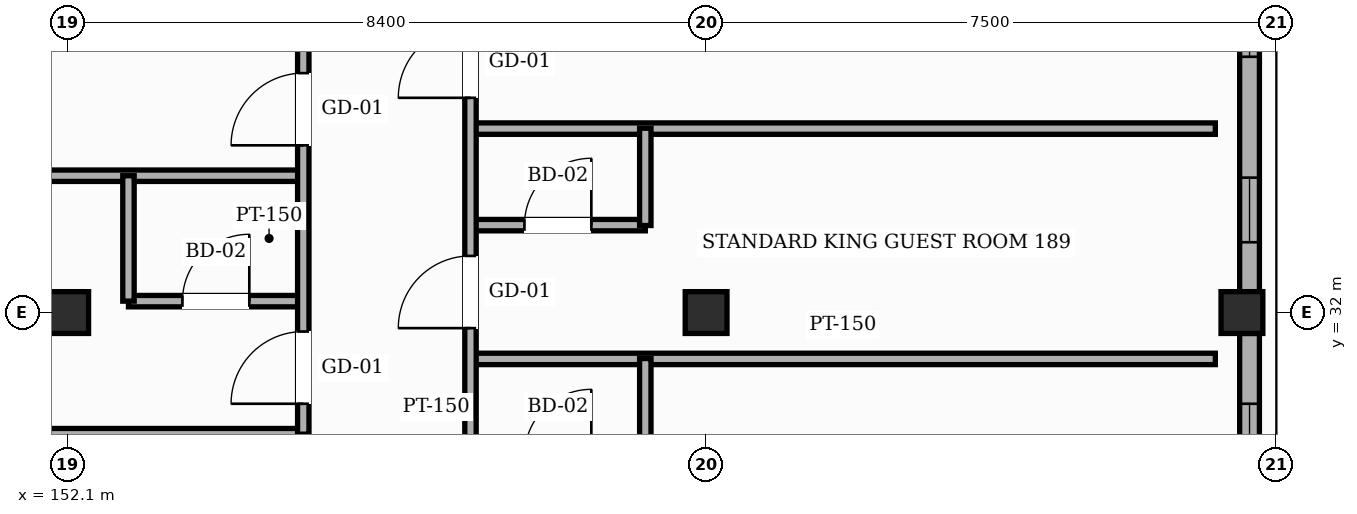
"""IFC4 building model, lengths in metres.
Left out: names, types, materials, properties, quantities, classifications, styles, units other than length and angle.
Written with IfcOpenShell. Run it as: python <this file> out.ifc"""

import sys

from ifc_helpers import new_model, si_unit, direction, frame, frame_2d, origin, origin_2d, place, context, subcontext, project, spatial, rectangle, hollow_rectangle, extrude, element, fill, save


model = new_model("IFC4")
c1 = context("Model", 3, precision=1e-05, world=origin(), true_north=direction((0.0, 1.0)))
c2 = subcontext(c1, "Body", "Model", "MODEL_VIEW")
j1 = project(units=[si_unit("LENGTHUNIT", "METRE"), si_unit("PLANEANGLEUNIT", "RADIAN")], contexts=[c1])
p1 = place(None, origin())
s1 = spatial("IfcSite", under=j1, at=p1, CompositionType="ELEMENT")
p2 = place(p1, origin())
s2 = spatial("IfcBuilding", under=s1, at=p2, CompositionType="ELEMENT")
p3 = place(p2, frame((0.0, 0.0, 31.8)))
s3 = spatial("IfcBuildingStorey", under=s2, at=p3, CompositionType="ELEMENT", Elevation=31.8)
for number, where, z_axis, x_axis in (
    (1, (152.1, 32.0, 0.0), (0.0, 0.0, 1.0), (1.0, 0.0, 0.0)),
    (2, (160.5, 32.0, 0.0), (0.0, 0.0, 1.0), (1.0, 0.0, 0.0)),
    (3, (167.55, 32.0, 0.0), (0.0, 0.0, 1.0), (1.0, 0.0, 0.0)),
):
    element("IfcColumn", number, at=place(p3, frame(where, z_axis=z_axis, x_axis=x_axis)), inside=s3, PredefinedType="COLUMN", context=c2, shape_type="SweptSolid", body=[
        extrude(hollow_rectangle(XDim=0.55, YDim=0.55, WallThickness=0.022, InnerFilletRadius=0.022, OuterFilletRadius=0.044, at=origin_2d()), origin(), (0.0, 0.0, 1.0), 3.6),
    ])
p4 = place(p3, frame((167.65, 31.725, 0.0), z_axis=(0.0, 0.0, 1.0), x_axis=(0.0, -1.0, 0.0)))
e4 = element("IfcWall", 4, at=p4, inside=s3, PredefinedType="SOLIDWALL", context=c2, shape_type="SweptSolid", body=[
    extrude(rectangle(XDim=7.45, YDim=0.26, at=frame_2d((3.725, 0.0))), origin(), (0.0, 0.0, 1.0), 2.755),
])
p5 = place(p4, frame((4.055, 0.0, 0.85)))
e5 = element("IfcOpeningElement", 5, at=p5, cuts=e4, PredefinedType="OPENING", context=c2, shape_type="SweptSolid", body=[
    extrude(rectangle(XDim=1.65, YDim=1.5, at=frame_2d((0.825, 0.75))), frame((0.0, 0.14, 0.0), z_axis=(0.0, -1.0, 0.0), x_axis=(1.0, 0.0, 0.0)), (0.0, 0.0, 1.0), 0.28),
])
p6 = place(p4, frame((0.925, 0.0, 0.85)))
e6 = element("IfcOpeningElement", 6, at=p6, cuts=e4, PredefinedType="OPENING", context=c2, shape_type="SweptSolid", body=[
    extrude(rectangle(XDim=1.85, YDim=1.5, at=frame_2d((0.925, 0.75))), frame((0.0, 0.14, 0.0), z_axis=(0.0, -1.0, 0.0), x_axis=(1.0, 0.0, 0.0)), (0.0, 0.0, 1.0), 0.28),
])
p7 = place(p3, frame((167.65, 40.625, 0.0), z_axis=(0.0, 0.0, 1.0), x_axis=(0.0, -1.0, 0.0)))
e7 = element("IfcWall", 7, at=p7, inside=s3, PredefinedType="SOLIDWALL", context=c2, shape_type="SweptSolid", body=[
    extrude(rectangle(XDim=8.35, YDim=0.26, at=frame_2d((4.175, 0.0))), origin(), (0.0, 0.0, 1.0), 2.755),
])
p8 = place(p7, frame((6.85, 0.0, 0.85)))
e8 = element("IfcOpeningElement", 8, at=p8, cuts=e7, PredefinedType="OPENING", context=c2, shape_type="SweptSolid", body=[
    extrude(rectangle(XDim=0.85, YDim=1.35, at=frame_2d((0.425, 0.675))), frame((0.0, 0.14, 0.0), z_axis=(0.0, -1.0, 0.0), x_axis=(1.0, 0.0, 0.0)), (0.0, 0.0, 1.0), 0.28),
])
p9 = place(p7, frame((4.11, 0.0, 0.85)))
e9 = element("IfcOpeningElement", 9, at=p9, cuts=e7, PredefinedType="OPENING", context=c2, shape_type="SweptSolid", body=[
    extrude(rectangle(XDim=1.15, YDim=1.65, at=frame_2d((0.575, 0.825))), frame((0.0, 0.14, 0.0), z_axis=(0.0, -1.0, 0.0), x_axis=(1.0, 0.0, 0.0)), (0.0, 0.0, 1.0), 0.28),
])
p10 = place(p7, frame((0.98, 0.0, 0.85)))
e10 = element("IfcOpeningElement", 10, at=p10, cuts=e7, PredefinedType="OPENING", context=c2, shape_type="SweptSolid", body=[
    extrude(rectangle(XDim=1.35, YDim=1.65, at=frame_2d((0.675, 0.825))), frame((0.0, 0.14, 0.0), z_axis=(0.0, -1.0, 0.0), x_axis=(1.0, 0.0, 0.0)), (0.0, 0.0, 1.0), 0.28),
])
p11 = place(p3, frame((144.2, 30.4, 0.0), z_axis=(0.0, 0.0, 1.0), x_axis=(1.0, 0.0, 0.0)))
e11 = element("IfcWall", 11, at=p11, inside=s3, PredefinedType="PARTITIONING", context=c2, shape_type="SweptSolid", body=[
    extrude(rectangle(XDim=11.0, YDim=0.15, at=frame_2d((5.5, 0.0))), origin(), (0.0, 0.0, 1.0), 3.365),
])
p12 = place(p3, frame((157.4, 31.39, 0.0), z_axis=(0.0, 0.0, 1.0), x_axis=(1.0, 0.0, 0.0)))
e12 = element("IfcWall", 12, at=p12, inside=s3, PredefinedType="PARTITIONING", context=c2, shape_type="SweptSolid", body=[
    extrude(rectangle(XDim=9.8, YDim=0.15, at=frame_2d((4.9, 0.0))), origin(), (0.0, 0.0, 1.0), 3.365),
])
p13 = place(p3, frame((152.9, 32.15, 0.0), z_axis=(0.0, 0.0, 1.0), x_axis=(1.0, 0.0, 0.0)))
e13 = element("IfcWall", 13, at=p13, inside=s3, PredefinedType="PARTITIONING", context=c2, shape_type="SweptSolid", body=[
    extrude(rectangle(XDim=2.3, YDim=0.15, at=frame_2d((1.15, 0.0))), origin(), (0.0, 0.0, 1.0), 2.755),
])
p14 = place(p13, frame((0.71, 0.0, 0.0)))
e14 = element("IfcOpeningElement", 14, at=p14, cuts=e13, PredefinedType="OPENING", context=c2, shape_type="SweptSolid", body=[
    extrude(rectangle(XDim=0.88, YDim=2.12, at=frame_2d((0.44, 1.06))), frame((0.0, 0.085, 0.0), z_axis=(0.0, -1.0, 0.0), x_axis=(1.0, 0.0, 0.0)), (0.0, 0.0, 1.0), 0.17),
])
p15 = place(p3, frame((157.4, 33.15, 0.0), z_axis=(0.0, 0.0, 1.0), x_axis=(1.0, 0.0, 0.0)))
e15 = element("IfcWall", 15, at=p15, inside=s3, PredefinedType="PARTITIONING", context=c2, shape_type="SweptSolid", body=[
    extrude(rectangle(XDim=2.3, YDim=0.15, at=frame_2d((1.15, 0.0))), origin(), (0.0, 0.0, 1.0), 3.365),
])
p16 = place(p15, frame((0.71, 0.0, 0.0)))
e16 = element("IfcOpeningElement", 16, at=p16, cuts=e15, PredefinedType="OPENING", context=c2, shape_type="SweptSolid", body=[
    extrude(rectangle(XDim=0.88, YDim=2.12, at=frame_2d((0.44, 1.06))), frame((0.0, 0.085, 0.0), z_axis=(0.0, -1.0, 0.0), x_axis=(1.0, 0.0, 0.0)), (0.0, 0.0, 1.0), 0.17),
])
p17 = place(p3, frame((144.2, 33.8, 0.0), z_axis=(0.0, 0.0, 1.0), x_axis=(1.0, 0.0, 0.0)))
e17 = element("IfcWall", 17, at=p17, inside=s3, PredefinedType="PARTITIONING", context=c2, shape_type="SweptSolid", body=[
    extrude(rectangle(XDim=11.0, YDim=0.15, at=frame_2d((5.5, 0.0))), origin(), (0.0, 0.0, 1.0), 3.365),
])
p18 = place(p3, frame((157.4, 34.42, 0.0), z_axis=(0.0, 0.0, 1.0), x_axis=(1.0, 0.0, 0.0)))
e18 = element("IfcWall", 18, at=p18, inside=s3, PredefinedType="PARTITIONING", context=c2, shape_type="SweptSolid", body=[
    extrude(rectangle(XDim=9.8, YDim=0.15, at=frame_2d((4.9, 0.0))), origin(), (0.0, 0.0, 1.0), 3.365),
])
p19 = place(p3, frame((152.9, 32.15, 0.0), z_axis=(0.0, 0.0, 1.0), x_axis=(0.0, 1.0, 0.0)))
e19 = element("IfcWall", 19, at=p19, inside=s3, PredefinedType="PARTITIONING", context=c2, shape_type="SweptSolid", body=[
    extrude(rectangle(XDim=1.65, YDim=0.15, at=frame_2d((0.825, 0.0))), origin(), (0.0, 0.0, 1.0), 3.365),
])
p20 = place(p3, frame((155.2, 30.4, 0.0), z_axis=(0.0, 0.0, 1.0), x_axis=(0.0, 1.0, 0.0)))
e20 = element("IfcWall", 20, at=p20, inside=s3, PredefinedType="PARTITIONING", context=c2, shape_type="SweptSolid", body=[
    extrude(rectangle(XDim=10.2, YDim=0.15, at=frame_2d((5.1, 0.0))), origin(), (0.0, 0.0, 1.0), 3.365),
])
p21 = place(p20, frame((0.4, 0.0, 0.0)))
e21 = element("IfcOpeningElement", 21, at=p21, cuts=e20, PredefinedType="OPENING", context=c2, shape_type="SweptSolid", body=[
    extrude(rectangle(XDim=0.95, YDim=2.15, at=frame_2d((0.475, 1.075))), frame((0.0, 0.085, 0.0), z_axis=(0.0, -1.0, 0.0), x_axis=(1.0, 0.0, 0.0)), (0.0, 0.0, 1.0), 0.17),
])
p22 = place(p20, frame((3.8, 0.0, 0.0)))
e22 = element("IfcOpeningElement", 22, at=p22, cuts=e20, PredefinedType="OPENING", context=c2, shape_type="SweptSolid", body=[
    extrude(rectangle(XDim=0.95, YDim=2.15, at=frame_2d((0.475, 1.075))), frame((0.0, 0.085, 0.0), z_axis=(0.0, -1.0, 0.0), x_axis=(1.0, 0.0, 0.0)), (0.0, 0.0, 1.0), 0.17),
])
p23 = place(p20, frame((7.2, 0.0, 0.0)))
e23 = element("IfcOpeningElement", 23, at=p23, cuts=e20, PredefinedType="OPENING", context=c2, shape_type="SweptSolid", body=[
    extrude(rectangle(XDim=0.95, YDim=2.15, at=frame_2d((0.475, 1.075))), frame((0.0, 0.085, 0.0), z_axis=(0.0, -1.0, 0.0), x_axis=(1.0, 0.0, 0.0)), (0.0, 0.0, 1.0), 0.17),
])
p24 = place(p3, frame((157.4, 22.3, 0.0), z_axis=(0.0, 0.0, 1.0), x_axis=(0.0, 1.0, 0.0)))
e24 = element("IfcWall", 24, at=p24, inside=s3, PredefinedType="PARTITIONING", context=c2, shape_type="SweptSolid", body=[
    extrude(rectangle(XDim=48.5, YDim=0.15, at=frame_2d((24.25, 0.0))), origin(), (0.0, 0.0, 1.0), 3.365),
])
p25 = place(p24, frame((0.4, 0.0, 0.0)))
e25 = element("IfcOpeningElement", 25, at=p25, cuts=e24, PredefinedType="OPENING", context=c2, shape_type="SweptSolid", body=[
    extrude(rectangle(XDim=0.95, YDim=2.15, at=frame_2d((0.475, 1.075))), frame((0.0, 0.085, 0.0), z_axis=(0.0, -1.0, 0.0), x_axis=(1.0, 0.0, 0.0)), (0.0, 0.0, 1.0), 0.17),
])
p26 = place(p24, frame((3.43, 0.0, 0.0)))
e26 = element("IfcOpeningElement", 26, at=p26, cuts=e24, PredefinedType="OPENING", context=c2, shape_type="SweptSolid", body=[
    extrude(rectangle(XDim=0.95, YDim=2.15, at=frame_2d((0.475, 1.075))), frame((0.0, 0.085, 0.0), z_axis=(0.0, -1.0, 0.0), x_axis=(1.0, 0.0, 0.0)), (0.0, 0.0, 1.0), 0.17),
])
p27 = place(p24, frame((6.46, 0.0, 0.0)))
e27 = element("IfcOpeningElement", 27, at=p27, cuts=e24, PredefinedType="OPENING", context=c2, shape_type="SweptSolid", body=[
    extrude(rectangle(XDim=0.95, YDim=2.15, at=frame_2d((0.475, 1.075))), frame((0.0, 0.085, 0.0), z_axis=(0.0, -1.0, 0.0), x_axis=(1.0, 0.0, 0.0)), (0.0, 0.0, 1.0), 0.17),
])
p28 = place(p24, frame((9.495, 0.0, 0.0)))
e28 = element("IfcOpeningElement", 28, at=p28, cuts=e24, PredefinedType="OPENING", context=c2, shape_type="SweptSolid", body=[
    extrude(rectangle(XDim=0.95, YDim=2.15, at=frame_2d((0.475, 1.075))), frame((0.0, 0.085, 0.0), z_axis=(0.0, -1.0, 0.0), x_axis=(1.0, 0.0, 0.0)), (0.0, 0.0, 1.0), 0.17),
])
p29 = place(p24, frame((12.525, 0.0, 0.0)))
e29 = element("IfcOpeningElement", 29, at=p29, cuts=e24, PredefinedType="OPENING", context=c2, shape_type="SweptSolid", body=[
    extrude(rectangle(XDim=0.95, YDim=2.15, at=frame_2d((0.475, 1.075))), frame((0.0, 0.085, 0.0), z_axis=(0.0, -1.0, 0.0), x_axis=(1.0, 0.0, 0.0)), (0.0, 0.0, 1.0), 0.17),
])
p30 = place(p24, frame((15.555, 0.0, 0.0)))
e30 = element("IfcOpeningElement", 30, at=p30, cuts=e24, PredefinedType="OPENING", context=c2, shape_type="SweptSolid", body=[
    extrude(rectangle(XDim=0.95, YDim=2.15, at=frame_2d((0.475, 1.075))), frame((0.0, 0.085, 0.0), z_axis=(0.0, -1.0, 0.0), x_axis=(1.0, 0.0, 0.0)), (0.0, 0.0, 1.0), 0.17),
])
p31 = place(p24, frame((18.585, 0.0, 0.0)))
e31 = element("IfcOpeningElement", 31, at=p31, cuts=e24, PredefinedType="OPENING", context=c2, shape_type="SweptSolid", body=[
    extrude(rectangle(XDim=0.95, YDim=2.15, at=frame_2d((0.475, 1.075))), frame((0.0, 0.085, 0.0), z_axis=(0.0, -1.0, 0.0), x_axis=(1.0, 0.0, 0.0)), (0.0, 0.0, 1.0), 0.17),
])
p32 = place(p24, frame((21.62, 0.0, 0.0)))
e32 = element("IfcOpeningElement", 32, at=p32, cuts=e24, PredefinedType="OPENING", context=c2, shape_type="SweptSolid", body=[
    extrude(rectangle(XDim=0.95, YDim=2.15, at=frame_2d((0.475, 1.075))), frame((0.0, 0.085, 0.0), z_axis=(0.0, -1.0, 0.0), x_axis=(1.0, 0.0, 0.0)), (0.0, 0.0, 1.0), 0.17),
])
p33 = place(p24, frame((24.65, 0.0, 0.0)))
e33 = element("IfcOpeningElement", 33, at=p33, cuts=e24, PredefinedType="OPENING", context=c2, shape_type="SweptSolid", body=[
    extrude(rectangle(XDim=0.95, YDim=2.15, at=frame_2d((0.475, 1.075))), frame((0.0, 0.085, 0.0), z_axis=(0.0, -1.0, 0.0), x_axis=(1.0, 0.0, 0.0)), (0.0, 0.0, 1.0), 0.17),
])
p34 = place(p24, frame((27.68, 0.0, 0.0)))
e34 = element("IfcOpeningElement", 34, at=p34, cuts=e24, PredefinedType="OPENING", context=c2, shape_type="SweptSolid", body=[
    extrude(rectangle(XDim=0.95, YDim=2.15, at=frame_2d((0.475, 1.075))), frame((0.0, 0.085, 0.0), z_axis=(0.0, -1.0, 0.0), x_axis=(1.0, 0.0, 0.0)), (0.0, 0.0, 1.0), 0.17),
])
p35 = place(p24, frame((30.71, 0.0, 0.0)))
e35 = element("IfcOpeningElement", 35, at=p35, cuts=e24, PredefinedType="OPENING", context=c2, shape_type="SweptSolid", body=[
    extrude(rectangle(XDim=0.95, YDim=2.15, at=frame_2d((0.475, 1.075))), frame((0.0, 0.085, 0.0), z_axis=(0.0, -1.0, 0.0), x_axis=(1.0, 0.0, 0.0)), (0.0, 0.0, 1.0), 0.17),
])
p36 = place(p24, frame((33.745, 0.0, 0.0)))
e36 = element("IfcOpeningElement", 36, at=p36, cuts=e24, PredefinedType="OPENING", context=c2, shape_type="SweptSolid", body=[
    extrude(rectangle(XDim=0.95, YDim=2.15, at=frame_2d((0.475, 1.075))), frame((0.0, 0.085, 0.0), z_axis=(0.0, -1.0, 0.0), x_axis=(1.0, 0.0, 0.0)), (0.0, 0.0, 1.0), 0.17),
])
p37 = place(p24, frame((36.775, 0.0, 0.0)))
e37 = element("IfcOpeningElement", 37, at=p37, cuts=e24, PredefinedType="OPENING", context=c2, shape_type="SweptSolid", body=[
    extrude(rectangle(XDim=0.95, YDim=2.15, at=frame_2d((0.475, 1.075))), frame((0.0, 0.085, 0.0), z_axis=(0.0, -1.0, 0.0), x_axis=(1.0, 0.0, 0.0)), (0.0, 0.0, 1.0), 0.17),
])
p38 = place(p24, frame((39.805, 0.0, 0.0)))
e38 = element("IfcOpeningElement", 38, at=p38, cuts=e24, PredefinedType="OPENING", context=c2, shape_type="SweptSolid", body=[
    extrude(rectangle(XDim=0.95, YDim=2.15, at=frame_2d((0.475, 1.075))), frame((0.0, 0.085, 0.0), z_axis=(0.0, -1.0, 0.0), x_axis=(1.0, 0.0, 0.0)), (0.0, 0.0, 1.0), 0.17),
])
p39 = place(p24, frame((42.84, 0.0, 0.0)))
e39 = element("IfcOpeningElement", 39, at=p39, cuts=e24, PredefinedType="OPENING", context=c2, shape_type="SweptSolid", body=[
    extrude(rectangle(XDim=0.95, YDim=2.15, at=frame_2d((0.475, 1.075))), frame((0.0, 0.085, 0.0), z_axis=(0.0, -1.0, 0.0), x_axis=(1.0, 0.0, 0.0)), (0.0, 0.0, 1.0), 0.17),
])
p40 = place(p24, frame((45.87, 0.0, 0.0)))
e40 = element("IfcOpeningElement", 40, at=p40, cuts=e24, PredefinedType="OPENING", context=c2, shape_type="SweptSolid", body=[
    extrude(rectangle(XDim=0.95, YDim=2.15, at=frame_2d((0.475, 1.075))), frame((0.0, 0.085, 0.0), z_axis=(0.0, -1.0, 0.0), x_axis=(1.0, 0.0, 0.0)), (0.0, 0.0, 1.0), 0.17),
])
p41 = place(p3, frame((159.7, 30.11, 0.0), z_axis=(0.0, 0.0, 1.0), x_axis=(0.0, 1.0, 0.0)))
e41 = element("IfcWall", 41, at=p41, inside=s3, PredefinedType="PARTITIONING", context=c2, shape_type="SweptSolid", body=[
    extrude(rectangle(XDim=1.285, YDim=0.15, at=frame_2d((0.643, 0.0))), origin(), (0.0, 0.0, 1.0), 3.365),
])
p42 = place(p3, frame((159.7, 33.145, 0.0), z_axis=(0.0, 0.0, 1.0), x_axis=(0.0, 1.0, 0.0)))
e42 = element("IfcWall", 42, at=p42, inside=s3, PredefinedType="PARTITIONING", context=c2, shape_type="SweptSolid", body=[
    extrude(rectangle(XDim=1.28, YDim=0.15, at=frame_2d((0.64, 0.0))), origin(), (0.0, 0.0, 1.0), 3.365),
])
p43 = place(p6, origin())
e43 = element("IfcWindow", 43, at=p43, inside=s3, PartitioningType="SINGLE_PANEL", PredefinedType="WINDOW", context=c2, shape_type="SweptSolid", body=[
    extrude(rectangle(XDim=1.85, YDim=1.5, at=frame_2d((0.925, 0.75))), frame((0.0, 0.03, 0.0), z_axis=(0.0, -1.0, 0.0), x_axis=(1.0, 0.0, 0.0)), (0.0, 0.0, 1.0), 0.06),
])
fill(e6, e43)
p44 = place(p8, origin())
e44 = element("IfcWindow", 44, at=p44, inside=s3, PartitioningType="SINGLE_PANEL", PredefinedType="WINDOW", context=c2, shape_type="SweptSolid", body=[
    extrude(rectangle(XDim=0.85, YDim=1.35, at=frame_2d((0.425, 0.675))), frame((0.0, 0.03, 0.0), z_axis=(0.0, -1.0, 0.0), x_axis=(1.0, 0.0, 0.0)), (0.0, 0.0, 1.0), 0.06),
])
fill(e8, e44)
p45 = place(p9, origin())
e45 = element("IfcWindow", 45, at=p45, inside=s3, PartitioningType="SINGLE_PANEL", PredefinedType="WINDOW", context=c2, shape_type="SweptSolid", body=[
    extrude(rectangle(XDim=1.15, YDim=1.65, at=frame_2d((0.575, 0.825))), frame((0.0, 0.03, 0.0), z_axis=(0.0, -1.0, 0.0), x_axis=(1.0, 0.0, 0.0)), (0.0, 0.0, 1.0), 0.06),
])
fill(e9, e45)
p46 = place(p21, origin())
e46 = element("IfcDoor", 46, at=p46, inside=s3, OperationType="SINGLE_SWING_LEFT", PredefinedType="DOOR", context=c2, shape_type="SweptSolid", body=[
    extrude(rectangle(XDim=0.95, YDim=2.15, at=frame_2d((0.475, 1.075))), frame((0.0, 0.025, 0.0), z_axis=(0.0, -1.0, 0.0), x_axis=(1.0, 0.0, 0.0)), (0.0, 0.0, 1.0), 0.05),
])
fill(e21, e46)
p47 = place(p14, origin())
e47 = element("IfcDoor", 47, at=p47, inside=s3, OperationType="SINGLE_SWING_RIGHT", PredefinedType="DOOR", context=c2, shape_type="SweptSolid", body=[
    extrude(rectangle(XDim=0.88, YDim=2.12, at=frame_2d((0.44, 1.06))), frame((0.0, 0.025, 0.0), z_axis=(0.0, -1.0, 0.0), x_axis=(1.0, 0.0, 0.0)), (0.0, 0.0, 1.0), 0.05),
])
fill(e14, e47)
p48 = place(p22, origin())
e48 = element("IfcDoor", 48, at=p48, inside=s3, OperationType="SINGLE_SWING_LEFT", PredefinedType="DOOR", context=c2, shape_type="SweptSolid", body=[
    extrude(rectangle(XDim=0.95, YDim=2.15, at=frame_2d((0.475, 1.075))), frame((0.0, 0.025, 0.0), z_axis=(0.0, -1.0, 0.0), x_axis=(1.0, 0.0, 0.0)), (0.0, 0.0, 1.0), 0.05),
])
fill(e22, e48)
p49 = place(p28, origin())
e49 = element("IfcDoor", 49, at=p49, inside=s3, OperationType="SINGLE_SWING_LEFT", PredefinedType="DOOR", context=c2, shape_type="SweptSolid", body=[
    extrude(rectangle(XDim=0.95, YDim=2.15, at=frame_2d((0.475, 1.075))), frame((0.0, 0.025, 0.0), z_axis=(0.0, -1.0, 0.0), x_axis=(1.0, 0.0, 0.0)), (0.0, 0.0, 1.0), 0.05),
])
fill(e28, e49)
p50 = place(p16, origin())
e50 = element("IfcDoor", 50, at=p50, inside=s3, OperationType="SINGLE_SWING_RIGHT", PredefinedType="DOOR", context=c2, shape_type="SweptSolid", body=[
    extrude(rectangle(XDim=0.88, YDim=2.12, at=frame_2d((0.44, 1.06))), frame((0.0, 0.025, 0.0), z_axis=(0.0, -1.0, 0.0), x_axis=(1.0, 0.0, 0.0)), (0.0, 0.0, 1.0), 0.05),
])
fill(e16, e50)
p51 = place(p29, origin())
e51 = element("IfcDoor", 51, at=p51, inside=s3, OperationType="SINGLE_SWING_LEFT", PredefinedType="DOOR", context=c2, shape_type="SweptSolid", body=[
    extrude(rectangle(XDim=0.95, YDim=2.15, at=frame_2d((0.475, 1.075))), frame((0.0, 0.025, 0.0), z_axis=(0.0, -1.0, 0.0), x_axis=(1.0, 0.0, 0.0)), (0.0, 0.0, 1.0), 0.05),
])
fill(e29, e51)
save(model, sys.argv[1])
